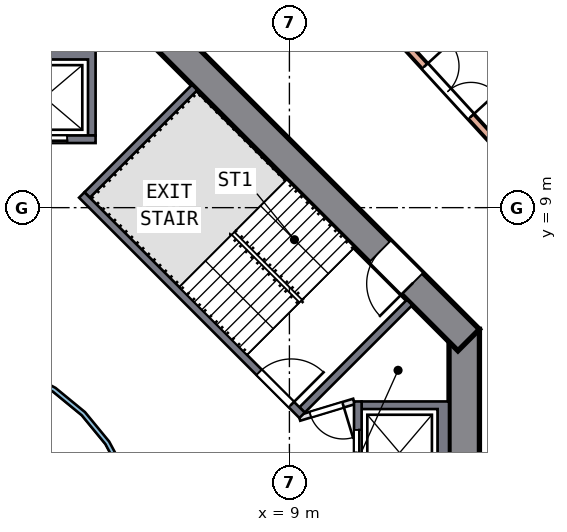
"""IFC4 building model, lengths in metres.
Left out: names, types, materials, properties, quantities, classifications, styles, units other than length and angle.
Written with IfcOpenShell. Run it as: python <this file> out.ifc"""

import sys

from ifc_helpers import new_model, si_unit, direction, frame, frame_2d, origin, place, context, subcontext, project, spatial, polyline, rectangle, outline, extrude, element, fill, save


model = new_model("IFC4")
c1 = context("Model", 3, precision=1e-05, world=origin(), true_north=direction((0.0, 1.0)))
c2 = subcontext(c1, "Body", "Model", "MODEL_VIEW")
j1 = project(units=[si_unit("LENGTHUNIT", "METRE"), si_unit("PLANEANGLEUNIT", "RADIAN")], contexts=[c1])
p1 = place(None, origin())
s1 = spatial("IfcSite", under=j1, at=p1, CompositionType="ELEMENT")
p2 = place(p1, origin())
s2 = spatial("IfcBuilding", under=s1, at=p2, CompositionType="ELEMENT")
p3 = place(p2, frame((0.0, 0.0, 86.0)))
s3 = spatial("IfcBuildingStorey", under=s2, at=p3, CompositionType="ELEMENT", Elevation=86.0)
p4 = place(p3, frame((13.6, -5.799, 0.0), z_axis=(0.0, 0.0, 1.0), x_axis=(0.0, 1.0, 0.0)))
e1 = element("IfcWall", 1, at=p4, inside=s3, PredefinedType="SHEAR", context=c2, shape_type="SweptSolid", body=[
    extrude(rectangle(XDim=11.598, YDim=0.8, at=frame_2d((5.799, 0.0))), origin(), (0.0, 0.0, 1.0), 3.5),
])
p5 = place(p4, frame((4.899, 0.0, 0.0)))
e2 = element("IfcOpeningElement", 2, at=p5, cuts=e1, PredefinedType="OPENING", context=c2, shape_type="SweptSolid", body=[
    extrude(rectangle(XDim=1.8, YDim=2.1, at=frame_2d((0.9, 1.05))), frame((0.0, 0.41, 0.0), z_axis=(0.0, -1.0, 0.0), x_axis=(1.0, 0.0, 0.0)), (0.0, 0.0, 1.0), 0.82),
])
p6 = place(p3, frame((13.717, 5.516, 0.0), z_axis=(0.0, 0.0, 1.0), x_axis=(-0.707106781, 0.707106781, 0.0)))
e3 = element("IfcWall", 3, at=p6, inside=s3, PredefinedType="SHEAR", context=c2, shape_type="SweptSolid", body=[
    extrude(rectangle(XDim=11.598, YDim=0.8, at=frame_2d((5.799, 0.0))), origin(), (0.0, 0.0, 1.0), 3.5),
])
p7 = place(p6, frame((2.099, 0.0, 0.0)))
e4 = element("IfcOpeningElement", 4, at=p7, cuts=e3, PredefinedType="OPENING", context=c2, shape_type="SweptSolid", body=[
    extrude(rectangle(XDim=1.2, YDim=2.1, at=frame_2d((0.6, 1.05))), frame((0.0, 0.41, 0.0), z_axis=(0.0, -1.0, 0.0), x_axis=(1.0, 0.0, 0.0)), (0.0, 0.0, 1.0), 0.82),
])
p8 = place(p3, frame((8.781, 16.854, 0.0), z_axis=(0.0, 0.0, 1.0), x_axis=(0.675332489, -0.737513409, 0.0)))
e5 = element("IfcWall", 5, at=p8, inside=s3, PredefinedType="SOLIDWALL", context=c2, shape_type="SweptSolid", body=[
    extrude(rectangle(XDim=13.0, YDim=0.2, at=frame_2d((6.5, 0.0))), origin(), (0.0, 0.0, 1.0), 3.19),
])
p9 = place(p8, frame((5.6, 0.0, 0.0)))
e6 = element("IfcOpeningElement", 6, at=p9, cuts=e5, PredefinedType="OPENING", context=c2, shape_type="SweptSolid", body=[
    extrude(rectangle(XDim=1.8, YDim=2.4, at=frame_2d((0.9, 1.2))), frame((0.0, 0.11, 0.0), z_axis=(0.0, -1.0, 0.0), x_axis=(1.0, 0.0, 0.0)), (0.0, 0.0, 1.0), 0.22),
])
p10 = place(p3, frame((22.19, 11.614, 0.0), z_axis=(0.0, 0.0, 1.0), x_axis=(-0.675335359, 0.737510781, 0.0)))
e7 = element("IfcWall", 7, at=p10, inside=s3, PredefinedType="SOLIDWALL", context=c2, shape_type="SweptSolid", body=[
    extrude(rectangle(XDim=12.84, YDim=0.1, at=frame_2d((6.42, 0.0))), origin(), (0.0, 0.0, 1.0), 0.7),
])
p11 = place(p3, origin())
e8 = element("IfcWall", 8, at=p11, inside=s3, PredefinedType="SOLIDWALL", context=c2, shape_type="SweptSolid", body=[
    extrude(outline(polyline([(13.2, 3.9), (13.2, 1.2), (10.9, 1.2), (10.9, 1.4), (12.9, 1.4), (12.9, 3.7), (10.9, 3.7), (10.9, 3.9), (13.2, 3.9)])), origin(), (0.0, 0.0, 1.0), 3.19),
])
p12 = place(p3, frame((10.8, 1.2, 0.0), z_axis=(0.0, 0.0, 1.0), x_axis=(0.0, 1.0, 0.0)))
e9 = element("IfcWall", 9, at=p12, inside=s3, PredefinedType="SOLIDWALL", context=c2, shape_type="SweptSolid", body=[
    extrude(rectangle(XDim=2.7, YDim=0.2, at=frame_2d((1.35, 0.0))), origin(), (0.0, 0.0, 1.0), 3.19),
])
p13 = place(p12, frame((0.75, 0.0, 0.0)))
e10 = element("IfcOpeningElement", 10, at=p13, cuts=e9, PredefinedType="OPENING", context=c2, shape_type="SweptSolid", body=[
    extrude(rectangle(XDim=1.2, YDim=2.1, at=frame_2d((0.6, 1.05))), frame((0.0, 0.11, 0.0), z_axis=(0.0, -1.0, 0.0), x_axis=(1.0, 0.0, 0.0)), (0.0, 0.0, 1.0), 0.22),
])
p14 = place(p3, origin())
e11 = element("IfcWall", 11, at=p14, inside=s3, PredefinedType="SOLIDWALL", context=c2, shape_type="SweptSolid", body=[
    extrude(outline(polyline([(3.9, 13.2), (3.9, 10.9), (3.7, 10.9), (3.7, 12.9), (1.4, 12.9), (1.4, 10.9), (1.2, 10.9), (1.2, 13.2), (3.9, 13.2)])), origin(), (0.0, 0.0, 1.0), 3.19),
])
p15 = place(p3, frame((1.2, 10.8, 0.0), z_axis=(0.0, 0.0, 1.0), x_axis=(1.0, 0.0, 0.0)))
e12 = element("IfcWall", 12, at=p15, inside=s3, PredefinedType="SOLIDWALL", context=c2, shape_type="SweptSolid", body=[
    extrude(rectangle(XDim=2.7, YDim=0.2, at=frame_2d((1.35, 0.0))), origin(), (0.0, 0.0, 1.0), 3.19),
])
p16 = place(p15, frame((0.75, 0.0, 0.0)))
e13 = element("IfcOpeningElement", 13, at=p16, cuts=e12, PredefinedType="OPENING", context=c2, shape_type="SweptSolid", body=[
    extrude(rectangle(XDim=1.2, YDim=2.1, at=frame_2d((0.6, 1.05))), frame((0.0, 0.11, 0.0), z_axis=(0.0, -1.0, 0.0), x_axis=(1.0, 0.0, 0.0)), (0.0, 0.0, 1.0), 0.22),
])
p17 = place(p3, frame((3.535, 9.334, 0.0), z_axis=(0.0, 0.0, 1.0), x_axis=(0.707106781, -0.707106781, 0.0)))
e14 = element("IfcWall", 14, at=p17, inside=s3, PredefinedType="SOLIDWALL", context=c2, shape_type="SweptSolid", body=[
    extrude(rectangle(XDim=8.2, YDim=0.2, at=frame_2d((4.1, 0.0))), origin(), (0.0, 0.0, 1.0), 3.19),
])
p18 = place(p17, frame((6.6, 0.0, 0.0)))
e15 = element("IfcOpeningElement", 15, at=p18, cuts=e14, PredefinedType="OPENING", context=c2, shape_type="SweptSolid", body=[
    extrude(rectangle(XDim=1.2, YDim=2.1, at=frame_2d((0.6, 1.05))), frame((0.0, 0.11, 0.0), z_axis=(0.0, -1.0, 0.0), x_axis=(1.0, 0.0, 0.0)), (0.0, 0.0, 1.0), 0.22),
])
for number, where, z_axis, x_axis in (
    (16, (9.334, 3.677, 0.0), (0.0, 0.0, 1.0), (0.707, 0.707, 0.0)),
    (17, (3.677, 9.334, 0.0), (0.0, 0.0, 1.0), (0.707, 0.707, 0.0)),
):
    element("IfcWall", number, at=place(p3, frame(where, z_axis=z_axis, x_axis=x_axis)), inside=s3, PredefinedType="SOLIDWALL", context=c2, shape_type="SweptSolid", body=[
        extrude(rectangle(XDim=4.0, YDim=0.2, at=frame_2d((2.0, 0.0))), origin(), (0.0, 0.0, 1.0), 3.19),
    ])
p19 = place(p3, frame((10.7, 3.9, 0.0), z_axis=(0.0, 0.0, 1.0), x_axis=(-0.957084567, -0.289808785, 0.0)))
e18 = element("IfcWall", 18, at=p19, inside=s3, PredefinedType="PARTITIONING", context=c2, shape_type="SweptSolid", body=[
    extrude(rectangle(XDim=1.501, YDim=0.15, at=frame_2d((0.75, 0.0))), origin(), (0.0, 0.0, 1.0), 3.19),
])
p20 = place(p19, frame((0.301, 0.0, 0.0)))
e19 = element("IfcOpeningElement", 19, at=p20, cuts=e18, PredefinedType="OPENING", context=c2, shape_type="SweptSolid", body=[
    extrude(rectangle(XDim=0.9, YDim=2.1, at=frame_2d((0.45, 1.05))), frame((0.0, 0.085, 0.0), z_axis=(0.0, -1.0, 0.0), x_axis=(1.0, 0.0, 0.0)), (0.0, 0.0, 1.0), 0.17),
])
p21 = place(p3, origin())
e20 = element("IfcWall", 20, at=p21, inside=s3, PredefinedType="SOLIDWALL", context=c2, shape_type="SweptSolid", body=[
    extrude(outline(polyline([(5.021, -0.999), (4.73, -1.959), (4.257, -2.844), (3.62, -3.62), (2.844, -4.257), (1.959, -4.73), (0.999, -5.021), (0.0, -5.12), (-0.999, -5.021), (-1.959, -4.73), (-2.844, -4.257), (-3.62, -3.62), (-4.257, -2.844), (-4.73, -1.959), (-5.021, -0.999), (-5.12, 0.0), (-5.021, 0.999), (-4.73, 1.959), (-4.257, 2.844), (-3.62, 3.62), (-2.844, 4.257), (-1.959, 4.73), (-0.999, 5.021), (0.0, 5.12), (0.999, 5.021), (1.959, 4.73), (2.844, 4.257), (3.62, 3.62), (4.257, 2.844), (4.73, 1.959), (5.021, 0.999), (5.12, 0.0), (5.021, -0.999)]), holes=[polyline([(4.904, 0.976), (4.619, 1.913), (4.157, 2.778), (3.535, 3.535), (2.778, 4.157), (1.913, 4.619), (0.976, 4.904), (0.0, 5.0), (-0.976, 4.904), (-1.913, 4.619), (-2.778, 4.157), (-3.535, 3.535), (-4.157, 2.778), (-4.619, 1.913), (-4.904, 0.976), (-5.0, 0.0), (-4.904, -0.976), (-4.619, -1.913), (-4.157, -2.778), (-3.535, -3.535), (-2.778, -4.157), (-1.913, -4.619), (-0.976, -4.904), (0.0, -5.0), (0.976, -4.904), (1.913, -4.619), (2.778, -4.157), (3.535, -3.535), (4.157, -2.778), (4.619, -1.913), (4.904, -0.976), (5.0, 0.0), (4.904, 0.976)])]), origin(), (0.0, 0.0, 1.0), 3.19),
])
p22 = place(p9, origin())
e21 = element("IfcDoor", 21, at=p22, inside=s3, OperationType="DOUBLE_DOOR_SINGLE_SWING", PredefinedType="DOOR", context=c2, shape_type="SweptSolid", body=[
    extrude(rectangle(XDim=1.8, YDim=2.4, at=frame_2d((0.9, 1.2))), frame((0.0, 0.025, 0.0), z_axis=(0.0, -1.0, 0.0), x_axis=(1.0, 0.0, 0.0)), (0.0, 0.0, 1.0), 0.05),
])
fill(e6, e21)
p23 = place(p13, origin())
e22 = element("IfcDoor", 22, at=p23, inside=s3, OperationType="DOUBLE_DOOR_SLIDING", PredefinedType="DOOR", context=c2, shape_type="SweptSolid", body=[
    extrude(rectangle(XDim=1.2, YDim=2.1, at=frame_2d((0.6, 1.05))), frame((0.0, 0.025, 0.0), z_axis=(0.0, -1.0, 0.0), x_axis=(1.0, 0.0, 0.0)), (0.0, 0.0, 1.0), 0.05),
])
fill(e10, e22)
p24 = place(p16, origin())
e23 = element("IfcDoor", 23, at=p24, inside=s3, OperationType="DOUBLE_DOOR_SLIDING", PredefinedType="DOOR", context=c2, shape_type="SweptSolid", body=[
    extrude(rectangle(XDim=1.2, YDim=2.1, at=frame_2d((0.6, 1.05))), frame((0.0, 0.025, 0.0), z_axis=(0.0, -1.0, 0.0), x_axis=(1.0, 0.0, 0.0)), (0.0, 0.0, 1.0), 0.05),
])
fill(e13, e23)
p25 = place(p18, origin())
e24 = element("IfcDoor", 24, at=p25, inside=s3, OperationType="SINGLE_SWING_RIGHT", PredefinedType="DOOR", context=c2, shape_type="SweptSolid", body=[
    extrude(rectangle(XDim=1.2, YDim=2.1, at=frame_2d((0.6, 1.05))), frame((0.0, 0.025, 0.0), z_axis=(0.0, -1.0, 0.0), x_axis=(1.0, 0.0, 0.0)), (0.0, 0.0, 1.0), 0.05),
])
fill(e15, e24)
p26 = place(p7, origin())
e25 = element("IfcDoor", 25, at=p26, inside=s3, OperationType="SINGLE_SWING_LEFT", PredefinedType="DOOR", context=c2, shape_type="SweptSolid", body=[
    extrude(rectangle(XDim=1.2, YDim=2.1, at=frame_2d((0.6, 1.05))), frame((0.0, 0.025, 0.0), z_axis=(0.0, -1.0, 0.0), x_axis=(1.0, 0.0, 0.0)), (0.0, 0.0, 1.0), 0.05),
])
fill(e4, e25)
p27 = place(p20, origin())
e26 = element("IfcDoor", 26, at=p27, inside=s3, OperationType="SINGLE_SWING_LEFT", PredefinedType="DOOR", context=c2, shape_type="SweptSolid", body=[
    extrude(rectangle(XDim=0.9, YDim=2.1, at=frame_2d((0.45, 1.05))), frame((0.0, 0.025, 0.0), z_axis=(0.0, -1.0, 0.0), x_axis=(1.0, 0.0, 0.0)), (0.0, 0.0, 1.0), 0.05),
])
fill(e19, e26)
save(model, sys.argv[1])
